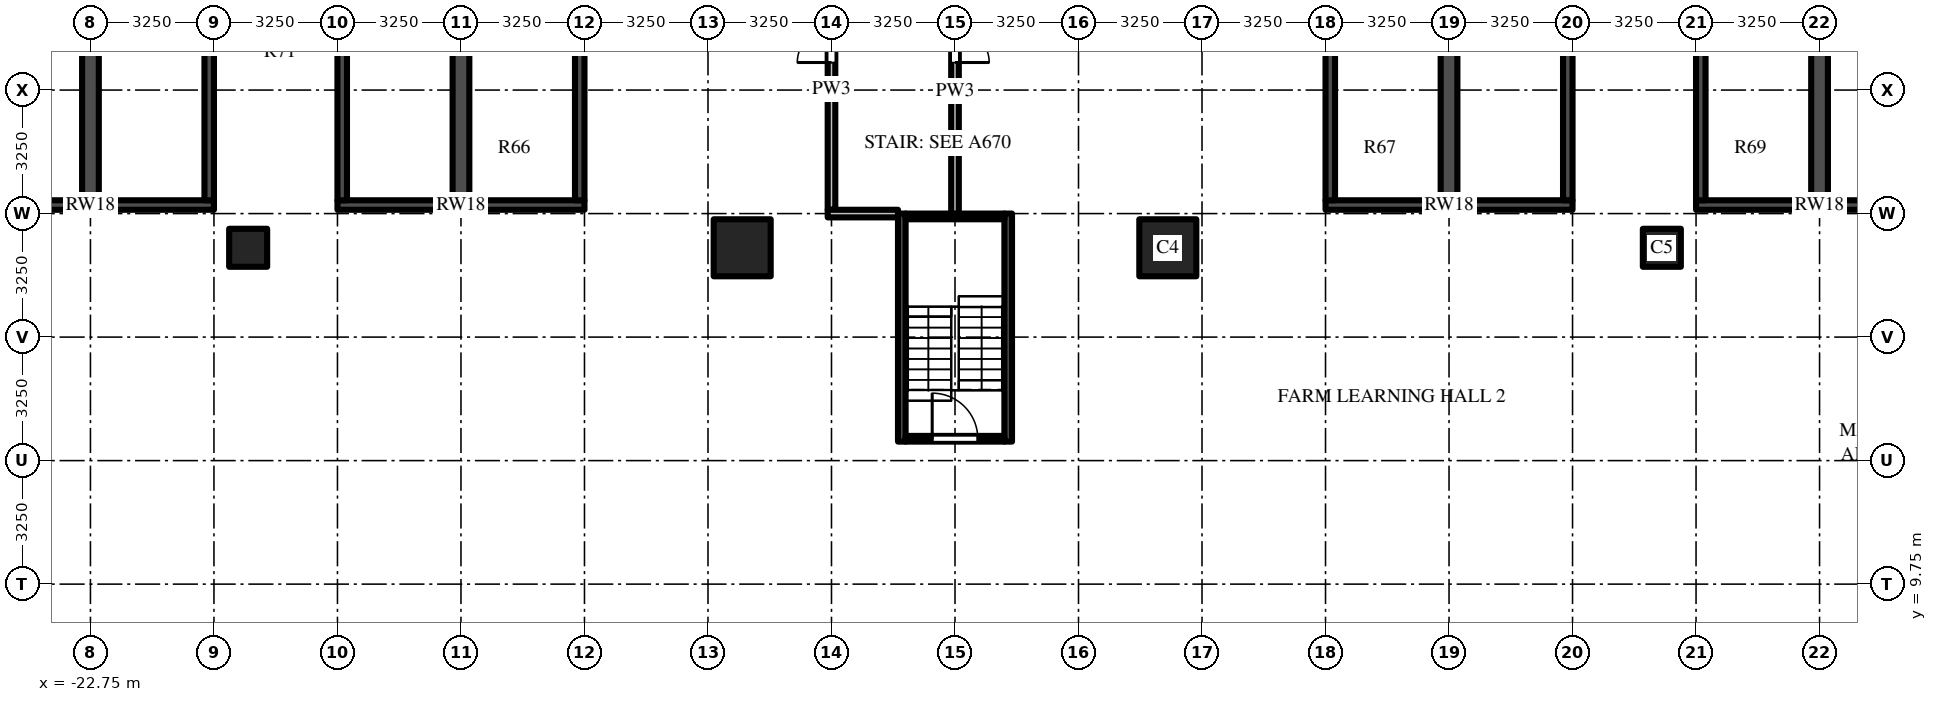
"""IFC4 building model, lengths in metres.
Left out: names, types, materials, properties, quantities, classifications, styles, units other than length and angle.
Written with IfcOpenShell. Run it as: python <this file> out.ifc"""

import sys

from ifc_helpers import new_model, si_unit, direction, frame, frame_2d, origin, origin_2d, place, context, subcontext, project, spatial, rectangle, extrude, source, transform, mapped, element, fill, save


model = new_model("IFC4")
c1 = context("Model", 3, precision=1e-05, world=origin(), true_north=direction((0.0, 1.0)))
c2 = subcontext(c1, "Body", "Model", "MODEL_VIEW")
j1 = project(units=[si_unit("LENGTHUNIT", "METRE"), si_unit("PLANEANGLEUNIT", "RADIAN")], contexts=[c1])
p1 = place(None, origin())
s1 = spatial("IfcSite", under=j1, at=p1, CompositionType="ELEMENT")
p2 = place(p1, origin())
s2 = spatial("IfcBuilding", under=s1, at=p2, CompositionType="ELEMENT")
p3 = place(p2, frame((0.0, 0.0, 29.0)))
s3 = spatial("IfcBuildingStorey", under=s2, at=p3, CompositionType="ELEMENT", Elevation=29.0)
m1 = source(origin(), c2, "Body", "SweptSolid", [
    extrude(rectangle(XDim=1.5, YDim=1.5, at=origin_2d()), origin(), (0.0, 0.0, 1.0), 5.0),
])
p4 = place(p3, frame((5.6, 18.6, 0.0), z_axis=(0.0, 0.0, 1.0), x_axis=(1.0, 0.0, 0.0)))
e1 = element("IfcColumn", 1, at=p4, inside=s3, PredefinedType="COLUMN", context=c2, shape_type="MappedRepresentation", body=[
    mapped(m1, transform((0.0, 0.0, 0.0))),
])
m2 = source(origin(), c2, "Body", "SweptSolid", [
    extrude(rectangle(XDim=1.0, YDim=1.0, at=origin_2d()), origin(), (0.0, 0.0, 1.0), 5.0),
])
p5 = place(p3, frame((18.6, 18.6, 0.0), z_axis=(0.0, 0.0, 1.0), x_axis=(1.0, 0.0, 0.0)))
e2 = element("IfcColumn", 2, at=p5, inside=s3, PredefinedType="COLUMN", context=c2, shape_type="MappedRepresentation", body=[
    mapped(m2, transform((0.0, 0.0, 0.0))),
])
p6 = place(p3, frame((-5.6, 18.6, 0.0), z_axis=(0.0, 0.0, 1.0), x_axis=(1.0, 0.0, 0.0)))
e3 = element("IfcColumn", 3, at=p6, inside=s3, PredefinedType="COLUMN", context=c2, shape_type="MappedRepresentation", body=[
    mapped(m1, transform((0.0, 0.0, 0.0))),
])
p7 = place(p3, frame((-18.6, 18.6, 0.0), z_axis=(0.0, 0.0, 1.0), x_axis=(1.0, 0.0, 0.0)))
e4 = element("IfcColumn", 4, at=p7, inside=s3, PredefinedType="COLUMN", context=c2, shape_type="MappedRepresentation", body=[
    mapped(m2, transform((0.0, 0.0, 0.0))),
])
m3 = source(origin(), c2, "Body", "SweptSolid", [
    extrude(rectangle(XDim=6.0, YDim=0.2, at=frame_2d((3.0, 0.0))), origin(), (0.0, 0.0, 1.0), 4.65),
])
for number, where, z_axis, x_axis in (
    (5, (-1.4, 13.5, 0.0), (0.0, 0.0, 1.0), (0.0, 1.0, 0.0)),
    (6, (1.4, 13.5, 0.0), (0.0, 0.0, 1.0), (0.0, 1.0, 0.0)),
):
    element("IfcWall", number, at=place(p3, frame(where, z_axis=z_axis, x_axis=x_axis)), inside=s3, PredefinedType="SHEAR", context=c2, shape_type="MappedRepresentation", body=[
        mapped(m3, transform((0.0, 0.0, 0.0))),
    ])
m4 = source(origin(), c2, "Body", "SweptSolid", [
    extrude(rectangle(XDim=2.6, YDim=0.15, at=frame_2d((1.3, 0.0))), origin(), (0.0, 0.0, 1.0), 4.65),
])
p8 = place(p3, frame((-1.3, 13.575, 0.0), z_axis=(0.0, 0.0, 1.0), x_axis=(1.0, 0.0, 0.0)))
e7 = element("IfcWall", 7, at=p8, inside=s3, PredefinedType="SHEAR", context=c2, shape_type="MappedRepresentation", body=[
    mapped(m4, transform((0.0, 0.0, 0.0))),
])
m5 = source(origin(), c2, "Body", "SweptSolid", [
    extrude(rectangle(XDim=1.2, YDim=2.1, at=frame_2d((0.6, 1.05))), frame((0.0, 0.085, 0.0), z_axis=(0.0, -1.0, 0.0), x_axis=(1.0, 0.0, 0.0)), (0.0, 0.0, 1.0), 0.17),
])
p9 = place(p8, frame((0.7, 0.0, 0.0)))
e8 = element("IfcOpeningElement", 8, at=p9, cuts=e7, PredefinedType="OPENING", context=c2, shape_type="MappedRepresentation", body=[
    mapped(m5, transform((0.0, 0.0, 0.0))),
])
p10 = place(p3, frame((-1.3, 19.425, 0.0), z_axis=(0.0, 0.0, 1.0), x_axis=(1.0, 0.0, 0.0)))
e9 = element("IfcWall", 9, at=p10, inside=s3, PredefinedType="SHEAR", context=c2, shape_type="MappedRepresentation", body=[
    mapped(m4, transform((0.0, 0.0, 0.0))),
])
m6 = source(origin(), c2, "Body", "SweptSolid", [
    extrude(rectangle(XDim=6.5, YDim=0.25, at=frame_2d((3.25, 0.0))), origin(), (0.0, 0.0, 1.0), 4.65),
])
p11 = place(p3, frame((-26.0, 19.725, 0.0), z_axis=(0.0, 0.0, 1.0), x_axis=(1.0, 0.0, 0.0)))
e10 = element("IfcWall", 10, at=p11, inside=s3, PredefinedType="SHEAR", context=c2, shape_type="MappedRepresentation", body=[
    mapped(m6, transform((0.0, 0.0, 0.0))),
])
m7 = source(origin(), c2, "Body", "SweptSolid", [
    extrude(rectangle(XDim=8.3, YDim=0.25, at=frame_2d((4.15, 0.0))), origin(), (0.0, 0.0, 1.0), 4.65),
])
p12 = place(p3, frame((-19.625, 19.85, 0.0), z_axis=(0.0, 0.0, 1.0), x_axis=(0.0, 1.0, 0.0)))
e11 = element("IfcWall", 11, at=p12, inside=s3, PredefinedType="SHEAR", context=c2, shape_type="MappedRepresentation", body=[
    mapped(m7, transform((0.0, 0.0, 0.0))),
])
m8 = source(origin(), c2, "Body", "SweptSolid", [
    extrude(rectangle(XDim=8.3, YDim=0.44, at=frame_2d((4.15, 0.0))), origin(), (0.0, 0.0, 1.0), 4.65),
])
p13 = place(p3, frame((-22.75, 19.85, 0.0), z_axis=(0.0, 0.0, 1.0), x_axis=(0.0, 1.0, 0.0)))
e12 = element("IfcWall", 12, at=p13, inside=s3, PredefinedType="SHEAR", context=c2, shape_type="MappedRepresentation", body=[
    mapped(m8, transform((0.0, 0.0, 0.0))),
])
p14 = place(p3, frame((-16.25, 19.725, 0.0), z_axis=(0.0, 0.0, 1.0), x_axis=(1.0, 0.0, 0.0)))
e13 = element("IfcWall", 13, at=p14, inside=s3, PredefinedType="SHEAR", context=c2, shape_type="MappedRepresentation", body=[
    mapped(m6, transform((0.0, 0.0, 0.0))),
])
for number, where, z_axis, x_axis in (
    (14, (-16.125, 19.85, 0.0), (0.0, 0.0, 1.0), (0.0, 1.0, 0.0)),
    (15, (-9.875, 19.85, 0.0), (0.0, 0.0, 1.0), (0.0, 1.0, 0.0)),
):
    element("IfcWall", number, at=place(p3, frame(where, z_axis=z_axis, x_axis=x_axis)), inside=s3, PredefinedType="SHEAR", context=c2, shape_type="MappedRepresentation", body=[
        mapped(m7, transform((0.0, 0.0, 0.0))),
    ])
p15 = place(p3, frame((-13.0, 19.85, 0.0), z_axis=(0.0, 0.0, 1.0), x_axis=(0.0, 1.0, 0.0)))
e16 = element("IfcWall", 16, at=p15, inside=s3, PredefinedType="SHEAR", context=c2, shape_type="MappedRepresentation", body=[
    mapped(m8, transform((0.0, 0.0, 0.0))),
])
p16 = place(p3, frame((9.75, 19.725, 0.0), z_axis=(0.0, 0.0, 1.0), x_axis=(1.0, 0.0, 0.0)))
e17 = element("IfcWall", 17, at=p16, inside=s3, PredefinedType="SHEAR", context=c2, shape_type="MappedRepresentation", body=[
    mapped(m6, transform((0.0, 0.0, 0.0))),
])
for number, where, z_axis, x_axis in (
    (18, (9.875, 19.85, 0.0), (0.0, 0.0, 1.0), (0.0, 1.0, 0.0)),
    (19, (16.125, 19.85, 0.0), (0.0, 0.0, 1.0), (0.0, 1.0, 0.0)),
):
    element("IfcWall", number, at=place(p3, frame(where, z_axis=z_axis, x_axis=x_axis)), inside=s3, PredefinedType="SHEAR", context=c2, shape_type="MappedRepresentation", body=[
        mapped(m7, transform((0.0, 0.0, 0.0))),
    ])
p17 = place(p3, frame((13.0, 19.85, 0.0), z_axis=(0.0, 0.0, 1.0), x_axis=(0.0, 1.0, 0.0)))
e20 = element("IfcWall", 20, at=p17, inside=s3, PredefinedType="SHEAR", context=c2, shape_type="MappedRepresentation", body=[
    mapped(m8, transform((0.0, 0.0, 0.0))),
])
p18 = place(p3, frame((19.5, 19.725, 0.0), z_axis=(0.0, 0.0, 1.0), x_axis=(1.0, 0.0, 0.0)))
e21 = element("IfcWall", 21, at=p18, inside=s3, PredefinedType="SHEAR", context=c2, shape_type="MappedRepresentation", body=[
    mapped(m6, transform((0.0, 0.0, 0.0))),
])
p19 = place(p3, frame((19.625, 19.85, 0.0), z_axis=(0.0, 0.0, 1.0), x_axis=(0.0, 1.0, 0.0)))
e22 = element("IfcWall", 22, at=p19, inside=s3, PredefinedType="SHEAR", context=c2, shape_type="MappedRepresentation", body=[
    mapped(m7, transform((0.0, 0.0, 0.0))),
])
p20 = place(p3, frame((22.75, 19.85, 0.0), z_axis=(0.0, 0.0, 1.0), x_axis=(0.0, 1.0, 0.0)))
e23 = element("IfcWall", 23, at=p20, inside=s3, PredefinedType="SHEAR", context=c2, shape_type="MappedRepresentation", body=[
    mapped(m8, transform((0.0, 0.0, 0.0))),
])
m9 = source(origin(), c2, "Body", "SweptSolid", [
    extrude(rectangle(XDim=3.188, YDim=0.2, at=frame_2d((1.594, 0.0))), origin(), (0.0, 0.0, 1.0), 4.65),
])
p21 = place(p3, frame((-3.25, 22.75, 0.0), z_axis=(0.0, 0.0, 1.0), x_axis=(0.0, 1.0, 0.0)))
e24 = element("IfcWall", 24, at=p21, inside=s3, PredefinedType="PARTITIONING", context=c2, shape_type="MappedRepresentation", body=[
    mapped(m9, transform((0.0, 0.0, 0.0))),
])
m10 = source(origin(), c2, "Body", "SweptSolid", [
    extrude(rectangle(XDim=1.8, YDim=2.1, at=frame_2d((0.9, 1.05))), frame((0.0, 0.11, 0.0), z_axis=(0.0, -1.0, 0.0), x_axis=(1.0, 0.0, 0.0)), (0.0, 0.0, 1.0), 0.22),
])
p22 = place(p21, frame((0.725, 0.0, 0.0)))
e25 = element("IfcOpeningElement", 25, at=p22, cuts=e24, PredefinedType="OPENING", context=c2, shape_type="MappedRepresentation", body=[
    mapped(m10, transform((0.0, 0.0, 0.0))),
])
m11 = source(origin(), c2, "Body", "SweptSolid", [
    extrude(rectangle(XDim=3.15, YDim=0.2, at=frame_2d((1.575, 0.0))), origin(), (0.0, 0.0, 1.0), 4.65),
])
p23 = place(p3, frame((-3.25, 19.6, 0.0), z_axis=(0.0, 0.0, 1.0), x_axis=(0.0, 1.0, 0.0)))
e26 = element("IfcWall", 26, at=p23, inside=s3, PredefinedType="PARTITIONING", context=c2, shape_type="MappedRepresentation", body=[
    mapped(m11, transform((0.0, 0.0, 0.0))),
])
m12 = source(origin(), c2, "Body", "SweptSolid", [
    extrude(rectangle(XDim=3.188, YDim=0.2, at=frame_2d((1.594, 0.0))), origin(), (0.0, 0.0, 1.0), 3.947),
])
p24 = place(p3, frame((0.0, 25.938, 0.0), z_axis=(0.0, 0.0, 1.0), x_axis=(0.0, -1.0, 0.0)))
e27 = element("IfcWall", 27, at=p24, inside=s3, PredefinedType="PARTITIONING", context=c2, shape_type="MappedRepresentation", body=[
    mapped(m12, transform((0.0, 0.0, 0.0))),
])
p25 = place(p24, frame((0.663, 0.0, 0.0)))
e28 = element("IfcOpeningElement", 28, at=p25, cuts=e27, PredefinedType="OPENING", context=c2, shape_type="MappedRepresentation", body=[
    mapped(m10, transform((0.0, 0.0, 0.0))),
])
m13 = source(origin(), c2, "Body", "SweptSolid", [
    extrude(rectangle(XDim=3.25, YDim=0.2, at=frame_2d((1.625, 0.0))), origin(), (0.0, 0.0, 1.0), 3.947),
])
p26 = place(p3, frame((0.0, 19.5, 0.0), z_axis=(0.0, 0.0, 1.0), x_axis=(0.0, 1.0, 0.0)))
e29 = element("IfcWall", 29, at=p26, inside=s3, PredefinedType="PARTITIONING", context=c2, shape_type="MappedRepresentation", body=[
    mapped(m13, transform((0.0, 0.0, 0.0))),
])
m14 = source(origin(), c2, "Body", "SweptSolid", [
    extrude(rectangle(XDim=1.85, YDim=0.2, at=frame_2d((0.925, 0.0))), origin(), (0.0, 0.0, 1.0), 3.947),
])
p27 = place(p3, frame((-1.5, 19.5, 0.0), z_axis=(0.0, 0.0, 1.0), x_axis=(-1.0, 0.0, 0.0)))
e30 = element("IfcWall", 30, at=p27, inside=s3, PredefinedType="PARTITIONING", context=c2, shape_type="MappedRepresentation", body=[
    mapped(m14, transform((0.0, 0.0, 0.0))),
])
m15 = source(origin(), c2, "Body", "SweptSolid", [
    extrude(rectangle(XDim=1.2, YDim=2.1, at=frame_2d((0.6, 1.05))), frame((0.0, 0.025, 0.0), z_axis=(0.0, -1.0, 0.0), x_axis=(1.0, 0.0, 0.0)), (0.0, 0.0, 1.0), 0.05),
])
p28 = place(p9, origin())
e31 = element("IfcDoor", 31, at=p28, inside=s3, OperationType="SINGLE_SWING_LEFT", PredefinedType="DOOR", context=c2, shape_type="MappedRepresentation", body=[
    mapped(m15, transform((0.0, 0.0, 0.0))),
])
fill(e8, e31)
m16 = source(origin(), c2, "Body", "SweptSolid", [
    extrude(rectangle(XDim=1.8, YDim=2.1, at=frame_2d((0.9, 1.05))), frame((0.0, 0.025, 0.0), z_axis=(0.0, -1.0, 0.0), x_axis=(1.0, 0.0, 0.0)), (0.0, 0.0, 1.0), 0.05),
])
p29 = place(p22, origin())
e32 = element("IfcDoor", 32, at=p29, inside=s3, OperationType="DOUBLE_DOOR_SINGLE_SWING", PredefinedType="DOOR", context=c2, shape_type="MappedRepresentation", body=[
    mapped(m16, transform((0.0, 0.0, 0.0))),
])
fill(e25, e32)
p30 = place(p25, origin())
e33 = element("IfcDoor", 33, at=p30, inside=s3, OperationType="DOUBLE_DOOR_SINGLE_SWING", PredefinedType="DOOR", context=c2, shape_type="MappedRepresentation", body=[
    mapped(m16, transform((0.0, 0.0, 0.0))),
])
fill(e28, e33)
save(model, sys.argv[1])
